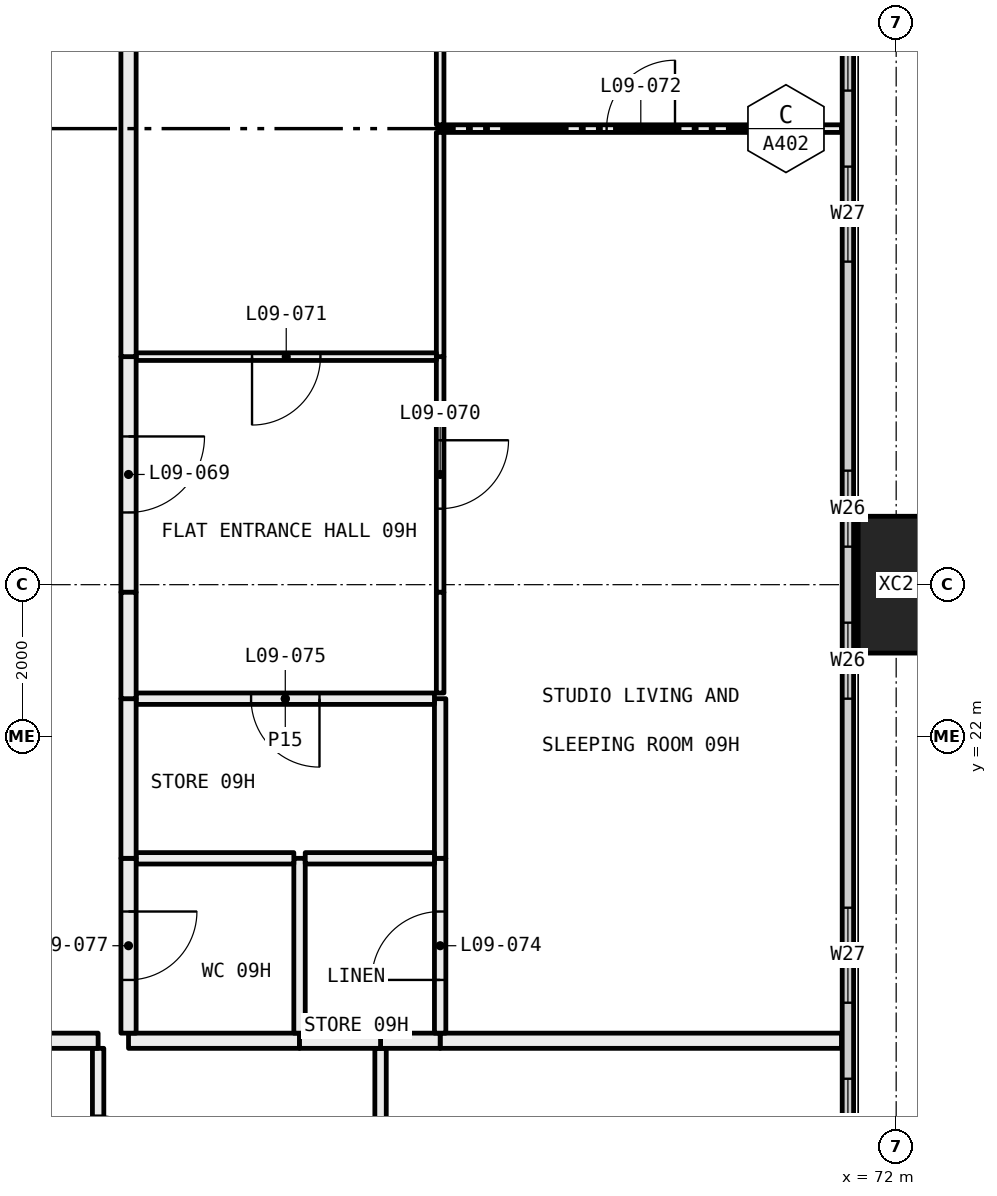
"""IFC4 building model, lengths in metres.
Left out: names, types, materials, properties, quantities, classifications, styles, units other than length and angle.
Written with IfcOpenShell. Run it as: python <this file> out.ifc"""

import sys

from ifc_helpers import new_model, si_unit, direction, frame, frame_2d, origin, origin_2d, place, context, subcontext, project, spatial, rectangle, hollow_rectangle, extrude, element, fill, save


model = new_model("IFC4")
c1 = context("Model", 3, precision=1e-05, world=origin(), true_north=direction((0.0, 1.0)))
c2 = subcontext(c1, "Body", "Model", "MODEL_VIEW")
j1 = project(units=[si_unit("LENGTHUNIT", "METRE"), si_unit("PLANEANGLEUNIT", "RADIAN")], contexts=[c1])
p1 = place(None, origin())
s1 = spatial("IfcSite", under=j1, at=p1, CompositionType="ELEMENT")
p2 = place(p1, origin())
s2 = spatial("IfcBuilding", under=s1, at=p2, CompositionType="ELEMENT")
p3 = place(p2, frame((0.0, 0.0, 43.8)))
s3 = spatial("IfcBuildingStorey", under=s2, at=p3, CompositionType="ELEMENT", Elevation=43.8)
p4 = place(p3, frame((72.0, 24.0, -0.4), z_axis=(0.0, 0.0, 1.0), x_axis=(0.0, 1.0, 0.0)))
e1 = element("IfcColumn", 1, at=p4, inside=s3, PredefinedType="COLUMN", context=c2, shape_type="SweptSolid", body=[
    extrude(hollow_rectangle(XDim=1.8, YDim=1.0, WallThickness=0.07, at=origin_2d()), origin(), (0.0, 0.0, 1.0), 3.45),
])
p5 = place(p3, frame((71.365, 6.71, 0.0), z_axis=(0.0, 0.0, 1.0), x_axis=(0.0, 1.0, 0.0)))
e2 = element("IfcWall", 2, at=p5, inside=s3, PredefinedType="ELEMENTEDWALL", context=c2, shape_type="SweptSolid", body=[
    extrude(rectangle(XDim=34.58, YDim=0.15, at=frame_2d((17.29, 0.0))), origin(), (0.0, 0.0, 1.0), 3.05),
])
p6 = place(p5, frame((0.29, 0.0, 0.45)))
e3 = element("IfcOpeningElement", 3, at=p6, cuts=e2, PredefinedType="OPENING", context=c2, shape_type="SweptSolid", body=[
    extrude(rectangle(XDim=4.5, YDim=2.55, at=frame_2d((2.25, 1.275))), frame((0.0, 0.085, 0.0), z_axis=(0.0, -1.0, 0.0), x_axis=(1.0, 0.0, 0.0)), (0.0, 0.0, 1.0), 0.17),
])
p7 = place(p5, frame((5.79, 0.0, 0.45)))
e4 = element("IfcOpeningElement", 4, at=p7, cuts=e2, PredefinedType="OPENING", context=c2, shape_type="SweptSolid", body=[
    extrude(rectangle(XDim=1.0, YDim=2.55, at=frame_2d((0.5, 1.275))), frame((0.0, 0.085, 0.0), z_axis=(0.0, -1.0, 0.0), x_axis=(1.0, 0.0, 0.0)), (0.0, 0.0, 1.0), 0.17),
])
p8 = place(p5, frame((9.54, 0.0, 0.45)))
e5 = element("IfcOpeningElement", 5, at=p8, cuts=e2, PredefinedType="OPENING", context=c2, shape_type="SweptSolid", body=[
    extrude(rectangle(XDim=1.25, YDim=2.55, at=frame_2d((0.625, 1.275))), frame((0.0, 0.085, 0.0), z_axis=(0.0, -1.0, 0.0), x_axis=(1.0, 0.0, 0.0)), (0.0, 0.0, 1.0), 0.17),
])
p9 = place(p5, frame((11.79, 0.0, 0.45)))
e6 = element("IfcOpeningElement", 6, at=p9, cuts=e2, PredefinedType="OPENING", context=c2, shape_type="SweptSolid", body=[
    extrude(rectangle(XDim=1.25, YDim=2.55, at=frame_2d((0.625, 1.275))), frame((0.0, 0.085, 0.0), z_axis=(0.0, -1.0, 0.0), x_axis=(1.0, 0.0, 0.0)), (0.0, 0.0, 1.0), 0.17),
])
p10 = place(p5, frame((15.79, 0.0, 0.45)))
e7 = element("IfcOpeningElement", 7, at=p10, cuts=e2, PredefinedType="OPENING", context=c2, shape_type="SweptSolid", body=[
    extrude(rectangle(XDim=1.0, YDim=2.55, at=frame_2d((0.5, 1.275))), frame((0.0, 0.085, 0.0), z_axis=(0.0, -1.0, 0.0), x_axis=(1.0, 0.0, 0.0)), (0.0, 0.0, 1.0), 0.17),
])
p11 = place(p5, frame((17.79, 0.0, 0.45)))
e8 = element("IfcOpeningElement", 8, at=p11, cuts=e2, PredefinedType="OPENING", context=c2, shape_type="SweptSolid", body=[
    extrude(rectangle(XDim=1.0, YDim=2.55, at=frame_2d((0.5, 1.275))), frame((0.0, 0.085, 0.0), z_axis=(0.0, -1.0, 0.0), x_axis=(1.0, 0.0, 0.0)), (0.0, 0.0, 1.0), 0.17),
])
p12 = place(p5, frame((21.54, 0.0, 0.45)))
e9 = element("IfcOpeningElement", 9, at=p12, cuts=e2, PredefinedType="OPENING", context=c2, shape_type="SweptSolid", body=[
    extrude(rectangle(XDim=1.25, YDim=2.55, at=frame_2d((0.625, 1.275))), frame((0.0, 0.085, 0.0), z_axis=(0.0, -1.0, 0.0), x_axis=(1.0, 0.0, 0.0)), (0.0, 0.0, 1.0), 0.17),
])
p13 = place(p5, frame((23.79, 0.0, 0.45)))
e10 = element("IfcOpeningElement", 10, at=p13, cuts=e2, PredefinedType="OPENING", context=c2, shape_type="SweptSolid", body=[
    extrude(rectangle(XDim=1.25, YDim=2.55, at=frame_2d((0.625, 1.275))), frame((0.0, 0.085, 0.0), z_axis=(0.0, -1.0, 0.0), x_axis=(1.0, 0.0, 0.0)), (0.0, 0.0, 1.0), 0.17),
])
p14 = place(p5, frame((27.79, 0.0, 0.45)))
e11 = element("IfcOpeningElement", 11, at=p14, cuts=e2, PredefinedType="OPENING", context=c2, shape_type="SweptSolid", body=[
    extrude(rectangle(XDim=1.0, YDim=2.55, at=frame_2d((0.5, 1.275))), frame((0.0, 0.085, 0.0), z_axis=(0.0, -1.0, 0.0), x_axis=(1.0, 0.0, 0.0)), (0.0, 0.0, 1.0), 0.17),
])
p15 = place(p5, frame((29.79, 0.0, 0.45)))
e12 = element("IfcOpeningElement", 12, at=p15, cuts=e2, PredefinedType="OPENING", context=c2, shape_type="SweptSolid", body=[
    extrude(rectangle(XDim=4.5, YDim=2.55, at=frame_2d((2.25, 1.275))), frame((0.0, 0.085, 0.0), z_axis=(0.0, -1.0, 0.0), x_axis=(1.0, 0.0, 0.0)), (0.0, 0.0, 1.0), 0.17),
])
p16 = place(p3, frame((61.5, 15.229, 0.0), z_axis=(0.0, 0.0, 1.0), x_axis=(0.0, 1.0, 0.0)))
e13 = element("IfcWall", 13, at=p16, inside=s3, PredefinedType="PARTITIONING", context=c2, shape_type="SweptSolid", body=[
    extrude(rectangle(XDim=2.671, YDim=0.15, at=frame_2d((1.335, 0.0))), origin(), (0.0, 0.0, 1.0), 3.05),
])
p17 = place(p16, frame((0.885, 0.0, 0.0)))
e14 = element("IfcOpeningElement", 14, at=p17, cuts=e13, PredefinedType="OPENING", context=c2, shape_type="SweptSolid", body=[
    extrude(rectangle(XDim=0.9, YDim=2.1, at=frame_2d((0.45, 1.05))), frame((0.0, 0.085, 0.0), z_axis=(0.0, -1.0, 0.0), x_axis=(1.0, 0.0, 0.0)), (0.0, 0.0, 1.0), 0.17),
])
p18 = place(p3, frame((61.5, 18.0, 0.0), z_axis=(0.0, 0.0, 1.0), x_axis=(-1.0, 0.0, 0.0)))
e15 = element("IfcWall", 15, at=p18, inside=s3, PredefinedType="PARTITIONING", context=c2, shape_type="SweptSolid", body=[
    extrude(rectangle(XDim=9.0, YDim=0.2, at=frame_2d((4.5, 0.0))), origin(), (0.0, 0.0, 1.0), 3.05),
])
p19 = place(p3, frame((65.216, 17.9, 0.0), z_axis=(0.0, 0.0, 1.0), x_axis=(0.0, -1.0, 0.0)))
e16 = element("IfcWall", 16, at=p19, inside=s3, PredefinedType="PARTITIONING", context=c2, shape_type="SweptSolid", body=[
    extrude(rectangle(XDim=2.671, YDim=0.15, at=frame_2d((1.335, 0.0))), origin(), (0.0, 0.0, 1.0), 3.05),
])
p20 = place(p3, frame((71.28, 18.0, 0.0), z_axis=(0.0, 0.0, 1.0), x_axis=(-1.0, 0.0, 0.0)))
e17 = element("IfcWall", 17, at=p20, inside=s3, PredefinedType="PARTITIONING", context=c2, shape_type="SweptSolid", body=[
    extrude(rectangle(XDim=5.28, YDim=0.2, at=frame_2d((2.64, 0.0))), origin(), (0.0, 0.0, 1.0), 3.05),
])
p21 = place(p3, frame((66.0, 18.0, 0.0), z_axis=(0.0, 0.0, 1.0), x_axis=(-1.0, 0.0, 0.0)))
e18 = element("IfcWall", 18, at=p21, inside=s3, PredefinedType="PARTITIONING", context=c2, shape_type="SweptSolid", body=[
    extrude(rectangle(XDim=0.784, YDim=0.2, at=frame_2d((0.392, 0.0))), origin(), (0.0, 0.0, 1.0), 3.05),
])
p22 = place(p3, frame((64.15, 18.0, 0.0), z_axis=(0.0, 0.0, 1.0), x_axis=(-1.0, 0.0, 0.0)))
e19 = element("IfcWall", 19, at=p22, inside=s3, PredefinedType="PARTITIONING", context=c2, shape_type="SweptSolid", body=[
    extrude(rectangle(XDim=2.25, YDim=0.2, at=frame_2d((1.125, 0.0))), origin(), (0.0, 0.0, 1.0), 3.05),
])
p23 = place(p3, frame((65.216, 18.0, 0.0), z_axis=(0.0, 0.0, 1.0), x_axis=(-1.0, 0.0, 0.0)))
e20 = element("IfcWall", 20, at=p23, inside=s3, PredefinedType="PARTITIONING", context=c2, shape_type="SweptSolid", body=[
    extrude(rectangle(XDim=1.066, YDim=0.2, at=frame_2d((0.533, 0.0))), origin(), (0.0, 0.0, 1.0), 3.05),
])
p24 = place(p3, frame((71.28, 30.0, 0.0), z_axis=(0.0, 0.0, 1.0), x_axis=(-1.0, 0.0, 0.0)))
e21 = element("IfcWall", 21, at=p24, inside=s3, PredefinedType="PARTITIONING", context=c2, shape_type="SweptSolid", body=[
    extrude(rectangle(XDim=5.28, YDim=0.1, at=frame_2d((2.64, 0.0))), origin(), (0.0, 0.0, 1.0), 3.05),
])
p25 = place(p24, frame((2.19, 0.0, 0.0)))
e22 = element("IfcOpeningElement", 22, at=p25, cuts=e21, PredefinedType="OPENING", context=c2, shape_type="SweptSolid", body=[
    extrude(rectangle(XDim=0.9, YDim=2.1, at=frame_2d((0.45, 1.05))), frame((0.0, 0.06, 0.0), z_axis=(0.0, -1.0, 0.0), x_axis=(1.0, 0.0, 0.0)), (0.0, 0.0, 1.0), 0.12),
])
p26 = place(p3, frame((66.0, 20.4, 0.0), z_axis=(0.0, 0.0, 1.0), x_axis=(0.0, -1.0, 0.0)))
e23 = element("IfcWall", 23, at=p26, inside=s3, PredefinedType="PARTITIONING", context=c2, shape_type="SweptSolid", body=[
    extrude(rectangle(XDim=2.3, YDim=0.15, at=frame_2d((1.15, 0.0))), origin(), (0.0, 0.0, 1.0), 3.05),
])
p27 = place(p26, frame((0.7, 0.0, 0.0)))
e24 = element("IfcOpeningElement", 24, at=p27, cuts=e23, PredefinedType="OPENING", context=c2, shape_type="SweptSolid", body=[
    extrude(rectangle(XDim=0.9, YDim=2.1, at=frame_2d((0.45, 1.05))), frame((0.0, 0.085, 0.0), z_axis=(0.0, -1.0, 0.0), x_axis=(1.0, 0.0, 0.0)), (0.0, 0.0, 1.0), 0.17),
])
p28 = place(p3, frame((66.0, 22.5, 0.0), z_axis=(0.0, 0.0, 1.0), x_axis=(0.0, -1.0, 0.0)))
e25 = element("IfcWall", 25, at=p28, inside=s3, PredefinedType="PARTITIONING", context=c2, shape_type="SweptSolid", body=[
    extrude(rectangle(XDim=2.1, YDim=0.15, at=frame_2d((1.05, 0.0))), origin(), (0.0, 0.0, 1.0), 3.05),
])
p29 = place(p3, frame((66.0, 27.0, 0.0), z_axis=(0.0, 0.0, 1.0), x_axis=(0.0, -1.0, 0.0)))
e26 = element("IfcWall", 26, at=p29, inside=s3, PredefinedType="PARTITIONING", context=c2, shape_type="SweptSolid", body=[
    extrude(rectangle(XDim=3.1, YDim=0.1, at=frame_2d((1.55, 0.0))), origin(), (0.0, 0.0, 1.0), 2.45),
])
p30 = place(p29, frame((1.1, 0.0, 0.0)))
e27 = element("IfcOpeningElement", 27, at=p30, cuts=e26, PredefinedType="OPENING", context=c2, shape_type="SweptSolid", body=[
    extrude(rectangle(XDim=0.9, YDim=2.1, at=frame_2d((0.45, 1.05))), frame((0.0, 0.06, 0.0), z_axis=(0.0, -1.0, 0.0), x_axis=(1.0, 0.0, 0.0)), (0.0, 0.0, 1.0), 0.12),
])
p31 = place(p3, frame((66.0, 23.9, 0.0), z_axis=(0.0, 0.0, 1.0), x_axis=(0.0, -1.0, 0.0)))
e28 = element("IfcWall", 28, at=p31, inside=s3, PredefinedType="PARTITIONING", context=c2, shape_type="SweptSolid", body=[
    extrude(rectangle(XDim=1.325, YDim=0.1, at=frame_2d((0.663, 0.0))), origin(), (0.0, 0.0, 1.0), 3.05),
])
p32 = place(p3, frame((66.0, 29.95, 0.0), z_axis=(0.0, 0.0, 1.0), x_axis=(0.0, -1.0, 0.0)))
e29 = element("IfcWall", 29, at=p32, inside=s3, PredefinedType="PARTITIONING", context=c2, shape_type="SweptSolid", body=[
    extrude(rectangle(XDim=2.95, YDim=0.1, at=frame_2d((1.475, 0.0))), origin(), (0.0, 0.0, 1.0), 3.05),
])
p33 = place(p3, frame((66.0, 35.95, 0.0), z_axis=(0.0, 0.0, 1.0), x_axis=(0.0, -1.0, 0.0)))
e30 = element("IfcWall", 30, at=p33, inside=s3, PredefinedType="PARTITIONING", context=c2, shape_type="SweptSolid", body=[
    extrude(rectangle(XDim=5.9, YDim=0.1, at=frame_2d((2.95, 0.0))), origin(), (0.0, 0.0, 1.0), 2.45),
])
p34 = place(p3, frame((64.15, 18.1, 0.0), z_axis=(0.0, 0.0, 1.0), x_axis=(0.0, 1.0, 0.0)))
e31 = element("IfcWall", 31, at=p34, inside=s3, PredefinedType="PARTITIONING", context=c2, shape_type="SweptSolid", body=[
    extrude(rectangle(XDim=2.3, YDim=0.15, at=frame_2d((1.15, 0.0))), origin(), (0.0, 0.0, 1.0), 3.05),
])
p35 = place(p3, frame((64.075, 20.4, 0.0), z_axis=(0.0, 0.0, 1.0), x_axis=(-1.0, 0.0, 0.0)))
e32 = element("IfcWall", 32, at=p35, inside=s3, PredefinedType="PARTITIONING", context=c2, shape_type="SweptSolid", body=[
    extrude(rectangle(XDim=2.075, YDim=0.15, at=frame_2d((1.038, 0.0))), origin(), (0.0, 0.0, 1.0), 3.05),
])
p36 = place(p3, frame((61.9, 20.4, 0.0), z_axis=(0.0, 0.0, 1.0), x_axis=(0.0, -1.0, 0.0)))
e33 = element("IfcWall", 33, at=p36, inside=s3, PredefinedType="PARTITIONING", context=c2, shape_type="SweptSolid", body=[
    extrude(rectangle(XDim=2.3, YDim=0.2, at=frame_2d((1.15, 0.0))), origin(), (0.0, 0.0, 1.0), 3.05),
])
p37 = place(p36, frame((0.7, 0.0, 0.0)))
e34 = element("IfcOpeningElement", 34, at=p37, cuts=e33, PredefinedType="OPENING", context=c2, shape_type="SweptSolid", body=[
    extrude(rectangle(XDim=0.9, YDim=2.1, at=frame_2d((0.45, 1.05))), frame((0.0, 0.11, 0.0), z_axis=(0.0, -1.0, 0.0), x_axis=(1.0, 0.0, 0.0)), (0.0, 0.0, 1.0), 0.22),
])
p38 = place(p3, frame((65.925, 20.4, 0.0), z_axis=(0.0, 0.0, 1.0), x_axis=(-1.0, 0.0, 0.0)))
e35 = element("IfcWall", 35, at=p38, inside=s3, PredefinedType="PARTITIONING", context=c2, shape_type="SweptSolid", body=[
    extrude(rectangle(XDim=1.7, YDim=0.15, at=frame_2d((0.85, 0.0))), origin(), (0.0, 0.0, 1.0), 3.05),
])
p39 = place(p3, frame((65.925, 22.5, 0.0), z_axis=(0.0, 0.0, 1.0), x_axis=(-1.0, 0.0, 0.0)))
e36 = element("IfcWall", 36, at=p39, inside=s3, PredefinedType="PARTITIONING", context=c2, shape_type="SweptSolid", body=[
    extrude(rectangle(XDim=3.925, YDim=0.15, at=frame_2d((1.962, 0.0))), origin(), (0.0, 0.0, 1.0), 3.05),
])
p40 = place(p39, frame((1.512, 0.0, 0.0)))
e37 = element("IfcOpeningElement", 37, at=p40, cuts=e36, PredefinedType="OPENING", context=c2, shape_type="SweptSolid", body=[
    extrude(rectangle(XDim=0.9, YDim=2.1, at=frame_2d((0.45, 1.05))), frame((0.0, 0.085, 0.0), z_axis=(0.0, -1.0, 0.0), x_axis=(1.0, 0.0, 0.0)), (0.0, 0.0, 1.0), 0.17),
])
p41 = place(p3, frame((61.9, 22.5, 0.0), z_axis=(0.0, 0.0, 1.0), x_axis=(0.0, -1.0, 0.0)))
e38 = element("IfcWall", 38, at=p41, inside=s3, PredefinedType="PARTITIONING", context=c2, shape_type="SweptSolid", body=[
    extrude(rectangle(XDim=2.1, YDim=0.2, at=frame_2d((1.05, 0.0))), origin(), (0.0, 0.0, 1.0), 3.05),
])
p42 = place(p3, frame((65.95, 27.0, 0.0), z_axis=(0.0, 0.0, 1.0), x_axis=(-1.0, 0.0, 0.0)))
e39 = element("IfcWall", 39, at=p42, inside=s3, PredefinedType="PARTITIONING", context=c2, shape_type="SweptSolid", body=[
    extrude(rectangle(XDim=3.95, YDim=0.1, at=frame_2d((1.975, 0.0))), origin(), (0.0, 0.0, 1.0), 3.05),
])
p43 = place(p42, frame((1.525, 0.0, 0.0)))
e40 = element("IfcOpeningElement", 40, at=p43, cuts=e39, PredefinedType="OPENING", context=c2, shape_type="SweptSolid", body=[
    extrude(rectangle(XDim=0.9, YDim=2.1, at=frame_2d((0.45, 1.05))), frame((0.0, 0.06, 0.0), z_axis=(0.0, -1.0, 0.0), x_axis=(1.0, 0.0, 0.0)), (0.0, 0.0, 1.0), 0.12),
])
p44 = place(p3, frame((61.9, 27.0, 0.0), z_axis=(0.0, 0.0, 1.0), x_axis=(0.0, -1.0, 0.0)))
e41 = element("IfcWall", 41, at=p44, inside=s3, PredefinedType="PARTITIONING", context=c2, shape_type="SweptSolid", body=[
    extrude(rectangle(XDim=3.1, YDim=0.2, at=frame_2d((1.55, 0.0))), origin(), (0.0, 0.0, 1.0), 2.45),
])
p45 = place(p44, frame((1.05, 0.0, 0.0)))
e42 = element("IfcOpeningElement", 42, at=p45, cuts=e41, PredefinedType="OPENING", context=c2, shape_type="SweptSolid", body=[
    extrude(rectangle(XDim=1.0, YDim=2.1, at=frame_2d((0.5, 1.05))), frame((0.0, 0.11, 0.0), z_axis=(0.0, -1.0, 0.0), x_axis=(1.0, 0.0, 0.0)), (0.0, 0.0, 1.0), 0.22),
])
p46 = place(p3, frame((61.9, 23.9, 0.0), z_axis=(0.0, 0.0, 1.0), x_axis=(0.0, -1.0, 0.0)))
e43 = element("IfcWall", 43, at=p46, inside=s3, PredefinedType="PARTITIONING", context=c2, shape_type="SweptSolid", body=[
    extrude(rectangle(XDim=1.4, YDim=0.2, at=frame_2d((0.7, 0.0))), origin(), (0.0, 0.0, 1.0), 3.05),
])
p47 = place(p3, frame((61.9, 35.9, 0.0), z_axis=(0.0, 0.0, 1.0), x_axis=(0.0, -1.0, 0.0)))
e44 = element("IfcWall", 44, at=p47, inside=s3, PredefinedType="PARTITIONING", context=c2, shape_type="SweptSolid", body=[
    extrude(rectangle(XDim=8.9, YDim=0.2, at=frame_2d((4.45, 0.0))), origin(), (0.0, 0.0, 1.0), 3.05),
])
p48 = place(p8, origin())
e45 = element("IfcWindow", 45, at=p48, inside=s3, PartitioningType="SINGLE_PANEL", PredefinedType="WINDOW", context=c2, shape_type="SweptSolid", body=[
    extrude(rectangle(XDim=1.25, YDim=2.55, at=frame_2d((0.625, 1.275))), frame((0.0, 0.03, 0.0), z_axis=(0.0, -1.0, 0.0), x_axis=(1.0, 0.0, 0.0)), (0.0, 0.0, 1.0), 0.06),
])
fill(e5, e45)
p49 = place(p9, origin())
e46 = element("IfcWindow", 46, at=p49, inside=s3, PartitioningType="SINGLE_PANEL", PredefinedType="WINDOW", context=c2, shape_type="SweptSolid", body=[
    extrude(rectangle(XDim=1.25, YDim=2.55, at=frame_2d((0.625, 1.275))), frame((0.0, 0.03, 0.0), z_axis=(0.0, -1.0, 0.0), x_axis=(1.0, 0.0, 0.0)), (0.0, 0.0, 1.0), 0.06),
])
fill(e6, e46)
p50 = place(p10, origin())
e47 = element("IfcWindow", 47, at=p50, inside=s3, PartitioningType="SINGLE_PANEL", PredefinedType="WINDOW", context=c2, shape_type="SweptSolid", body=[
    extrude(rectangle(XDim=1.0, YDim=2.55, at=frame_2d((0.5, 1.275))), frame((0.0, 0.03, 0.0), z_axis=(0.0, -1.0, 0.0), x_axis=(1.0, 0.0, 0.0)), (0.0, 0.0, 1.0), 0.06),
])
fill(e7, e47)
p51 = place(p11, origin())
e48 = element("IfcWindow", 48, at=p51, inside=s3, PartitioningType="SINGLE_PANEL", PredefinedType="WINDOW", context=c2, shape_type="SweptSolid", body=[
    extrude(rectangle(XDim=1.0, YDim=2.55, at=frame_2d((0.5, 1.275))), frame((0.0, 0.03, 0.0), z_axis=(0.0, -1.0, 0.0), x_axis=(1.0, 0.0, 0.0)), (0.0, 0.0, 1.0), 0.06),
])
fill(e8, e48)
p52 = place(p12, origin())
e49 = element("IfcWindow", 49, at=p52, inside=s3, PartitioningType="SINGLE_PANEL", PredefinedType="WINDOW", context=c2, shape_type="SweptSolid", body=[
    extrude(rectangle(XDim=1.25, YDim=2.55, at=frame_2d((0.625, 1.275))), frame((0.0, 0.03, 0.0), z_axis=(0.0, -1.0, 0.0), x_axis=(1.0, 0.0, 0.0)), (0.0, 0.0, 1.0), 0.06),
])
fill(e9, e49)
p53 = place(p13, origin())
e50 = element("IfcWindow", 50, at=p53, inside=s3, PartitioningType="SINGLE_PANEL", PredefinedType="WINDOW", context=c2, shape_type="SweptSolid", body=[
    extrude(rectangle(XDim=1.25, YDim=2.55, at=frame_2d((0.625, 1.275))), frame((0.0, 0.03, 0.0), z_axis=(0.0, -1.0, 0.0), x_axis=(1.0, 0.0, 0.0)), (0.0, 0.0, 1.0), 0.06),
])
fill(e10, e50)
p54 = place(p17, frame((0.9, 0.0, 0.0), x_axis=(-1.0, 0.0, 0.0)))
e51 = element("IfcDoor", 51, at=p54, inside=s3, OperationType="SINGLE_SWING_LEFT", PredefinedType="DOOR", context=c2, shape_type="SweptSolid", body=[
    extrude(rectangle(XDim=0.9, YDim=2.1, at=frame_2d((0.45, 1.05))), frame((0.0, 0.025, 0.0), z_axis=(0.0, -1.0, 0.0), x_axis=(1.0, 0.0, 0.0)), (0.0, 0.0, 1.0), 0.05),
])
fill(e14, e51)
p55 = place(p45, origin())
e52 = element("IfcDoor", 52, at=p55, inside=s3, OperationType="SINGLE_SWING_RIGHT", PredefinedType="DOOR", context=c2, shape_type="SweptSolid", body=[
    extrude(rectangle(XDim=1.0, YDim=2.1, at=frame_2d((0.5, 1.05))), frame((0.0, 0.025, 0.0), z_axis=(0.0, -1.0, 0.0), x_axis=(1.0, 0.0, 0.0)), (0.0, 0.0, 1.0), 0.05),
])
fill(e42, e52)
p56 = place(p30, origin())
e53 = element("IfcDoor", 53, at=p56, inside=s3, OperationType="SINGLE_SWING_RIGHT", PredefinedType="DOOR", context=c2, shape_type="SweptSolid", body=[
    extrude(rectangle(XDim=0.9, YDim=2.1, at=frame_2d((0.45, 1.05))), frame((0.0, 0.025, 0.0), z_axis=(0.0, -1.0, 0.0), x_axis=(1.0, 0.0, 0.0)), (0.0, 0.0, 1.0), 0.05),
])
fill(e27, e53)
p57 = place(p43, origin())
e54 = element("IfcDoor", 54, at=p57, inside=s3, OperationType="SINGLE_SWING_LEFT", PredefinedType="DOOR", context=c2, shape_type="SweptSolid", body=[
    extrude(rectangle(XDim=0.9, YDim=2.1, at=frame_2d((0.45, 1.05))), frame((0.0, 0.025, 0.0), z_axis=(0.0, -1.0, 0.0), x_axis=(1.0, 0.0, 0.0)), (0.0, 0.0, 1.0), 0.05),
])
fill(e40, e54)
p58 = place(p25, frame((0.9, 0.0, 0.0), x_axis=(-1.0, 0.0, 0.0)))
e55 = element("IfcDoor", 55, at=p58, inside=s3, OperationType="SINGLE_SWING_LEFT", PredefinedType="DOOR", context=c2, shape_type="SweptSolid", body=[
    extrude(rectangle(XDim=0.9, YDim=2.1, at=frame_2d((0.45, 1.05))), frame((0.0, 0.025, 0.0), z_axis=(0.0, -1.0, 0.0), x_axis=(1.0, 0.0, 0.0)), (0.0, 0.0, 1.0), 0.05),
])
fill(e22, e55)
p59 = place(p27, frame((0.9, 0.0, 0.0), x_axis=(-1.0, 0.0, 0.0)))
e56 = element("IfcDoor", 56, at=p59, inside=s3, OperationType="SINGLE_SWING_RIGHT", PredefinedType="DOOR", context=c2, shape_type="SweptSolid", body=[
    extrude(rectangle(XDim=0.9, YDim=2.1, at=frame_2d((0.45, 1.05))), frame((0.0, 0.025, 0.0), z_axis=(0.0, -1.0, 0.0), x_axis=(1.0, 0.0, 0.0)), (0.0, 0.0, 1.0), 0.05),
])
fill(e24, e56)
p60 = place(p40, origin())
e57 = element("IfcDoor", 57, at=p60, inside=s3, OperationType="SINGLE_SWING_RIGHT", PredefinedType="DOOR", context=c2, shape_type="SweptSolid", body=[
    extrude(rectangle(XDim=0.9, YDim=2.1, at=frame_2d((0.45, 1.05))), frame((0.0, 0.025, 0.0), z_axis=(0.0, -1.0, 0.0), x_axis=(1.0, 0.0, 0.0)), (0.0, 0.0, 1.0), 0.05),
])
fill(e37, e57)
p61 = place(p37, origin())
e58 = element("IfcDoor", 58, at=p61, inside=s3, OperationType="SINGLE_SWING_RIGHT", PredefinedType="DOOR", context=c2, shape_type="SweptSolid", body=[
    extrude(rectangle(XDim=0.9, YDim=2.1, at=frame_2d((0.45, 1.05))), frame((0.0, 0.025, 0.0), z_axis=(0.0, -1.0, 0.0), x_axis=(1.0, 0.0, 0.0)), (0.0, 0.0, 1.0), 0.05),
])
fill(e34, e58)
save(model, sys.argv[1])
